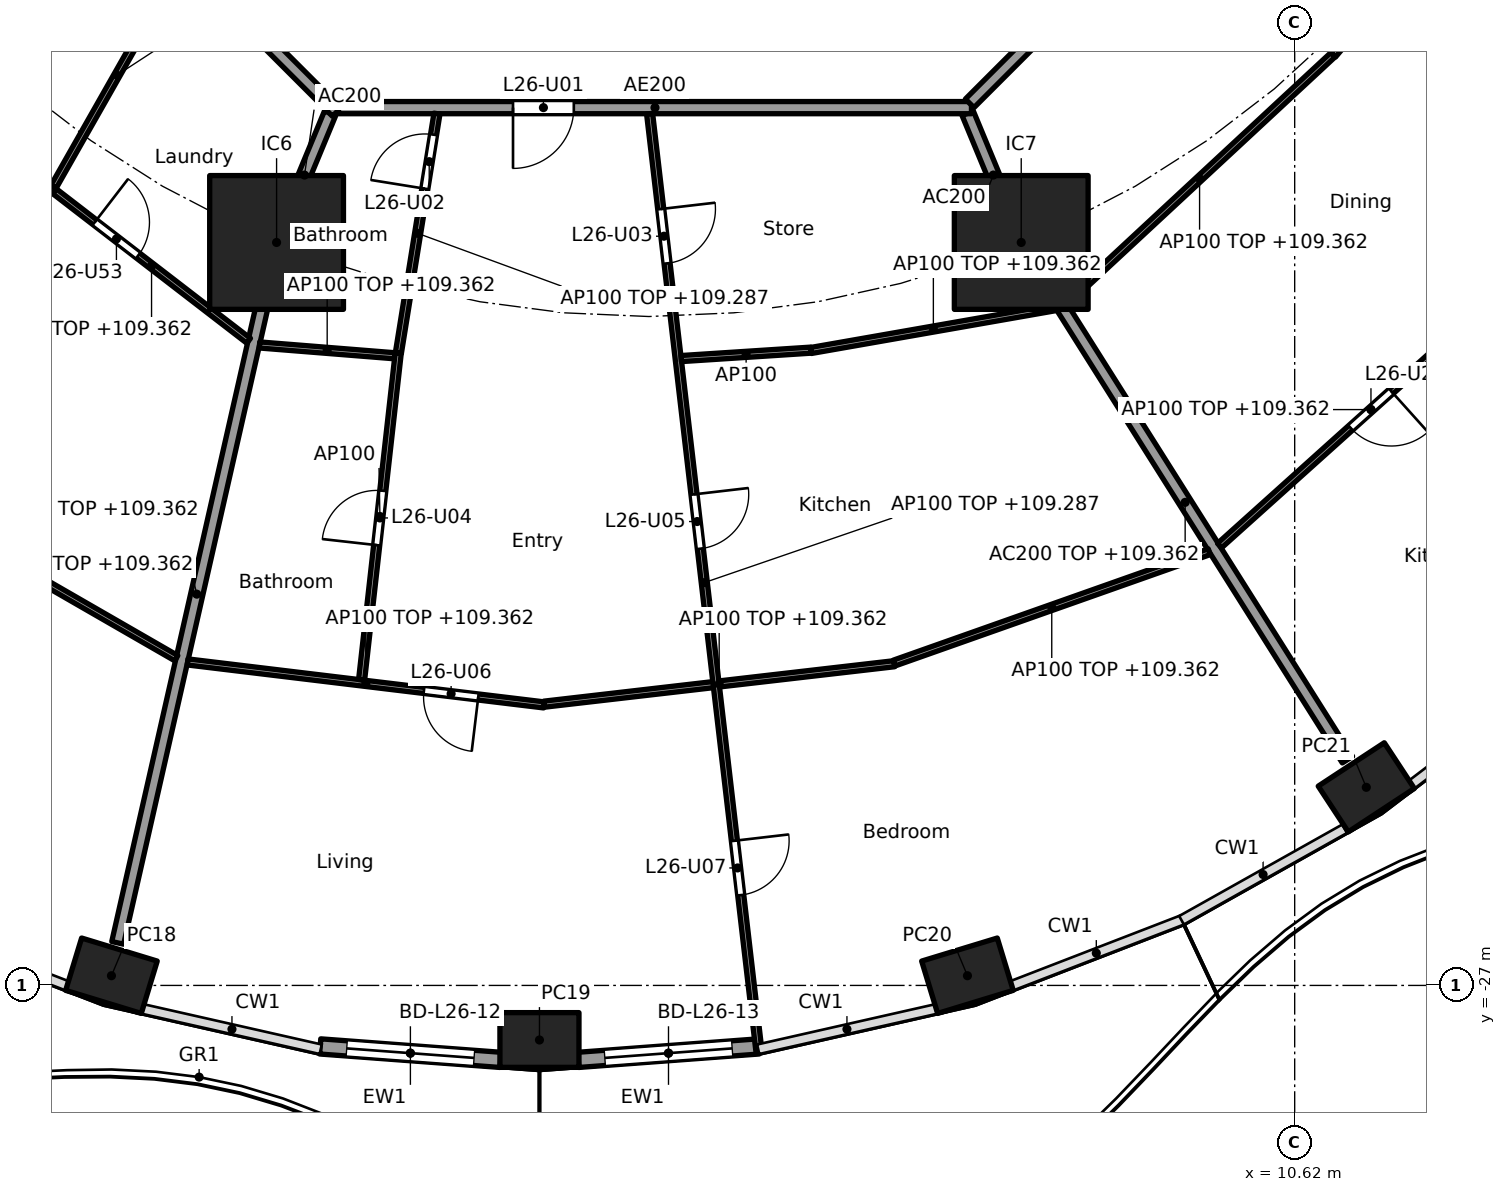
"""IFC4 building model, lengths in metres.
Left out: names, types, materials, properties, quantities, classifications, styles, units other than length and angle.
Written with IfcOpenShell. Run it as: python <this file> out.ifc"""

import sys

from ifc_helpers import new_model, si_unit, direction, frame, frame_2d, origin, origin_2d, place, context, subcontext, project, spatial, rectangle, hollow_rectangle, extrude, element, fill, save


model = new_model("IFC4")
c1 = context("Model", 3, precision=1e-05, world=origin(), true_north=direction((0.0, 1.0)))
c2 = subcontext(c1, "Body", "Model", "MODEL_VIEW")
j1 = project(units=[si_unit("LENGTHUNIT", "METRE"), si_unit("PLANEANGLEUNIT", "RADIAN")], contexts=[c1])
p1 = place(None, origin())
s1 = spatial("IfcSite", under=j1, at=p1, CompositionType="ELEMENT")
p2 = place(p1, origin())
s2 = spatial("IfcBuilding", under=s1, at=p2, CompositionType="ELEMENT")
p3 = place(p2, frame((0.0, 0.0, 106.6)))
s3 = spatial("IfcBuildingStorey", under=s2, at=p3, CompositionType="ELEMENT", Elevation=106.6)
for number, where, z_axis, x_axis in (
    (1, (-8.839, -26.841, 0.0), (0.0, 0.0, 1.0), (0.957, -0.292, 0.0)),
    (2, (-1.8, -27.897, 0.0), (0.0, 0.0, 1.0), (1.0, 0.0, 0.0)),
    (3, (5.239, -26.841, 0.0), (0.0, 0.0, 1.0), (0.957, 0.292, 0.0)),
    (4, (11.798, -23.742, 0.0), (0.0, 0.0, 1.0), (0.836, 0.549, 0.0)),
):
    element("IfcColumn", number, at=place(p3, frame(where, z_axis=z_axis, x_axis=x_axis)), inside=s3, PredefinedType="COLUMN", context=c2, shape_type="SweptSolid", body=[
        extrude(hollow_rectangle(XDim=1.3, YDim=0.9, WallThickness=0.045, at=origin_2d()), origin(), (0.0, 0.0, 1.0), 3.7),
    ])
for number, where, z_axis, x_axis in (
    (5, (-6.123, -14.782, 0.0), (0.0, 0.0, 1.0), (1.0, 0.0, 0.0)),
    (6, (6.123, -14.782, 0.0), (0.0, 0.0, 1.0), (1.0, 0.0, 0.0)),
):
    element("IfcColumn", number, at=place(p3, frame(where, z_axis=z_axis, x_axis=x_axis)), inside=s3, PredefinedType="COLUMN", context=c2, shape_type="SweptSolid", body=[
        extrude(rectangle(XDim=2.2, YDim=2.2, at=origin_2d()), origin(), (0.0, 0.0, 1.0), 3.7),
    ])
p4 = place(p3, frame((-2.439, -28.224, 0.0), z_axis=(0.0, 0.0, 1.0), x_axis=(-0.997225719788, 0.074436978672, 0.0)))
e7 = element("IfcWall", 7, at=p4, inside=s3, PredefinedType="SOLIDWALL", context=c2, shape_type="SweptSolid", body=[
    extrude(rectangle(XDim=2.975, YDim=0.25, at=frame_2d((1.487, 0.0))), origin(), (0.0, 0.0, 1.0), 3.44),
])
p5 = place(p4, frame((0.438, 0.0, 0.0)))
e8 = element("IfcOpeningElement", 8, at=p5, cuts=e7, PredefinedType="OPENING", context=c2, shape_type="SweptSolid", body=[
    extrude(rectangle(XDim=2.1, YDim=2.4, at=frame_2d((1.05, 1.2))), frame((0.0, 0.135, 0.0), z_axis=(0.0, -1.0, 0.0), x_axis=(1.0, 0.0, 0.0)), (0.0, 0.0, 1.0), 0.27),
])
p6 = place(p3, frame((1.806, -28.003, 0.0), z_axis=(0.0, 0.0, 1.0), x_axis=(-0.997226174467, -0.074430887117, 0.0)))
e9 = element("IfcWall", 9, at=p6, inside=s3, PredefinedType="SOLIDWALL", context=c2, shape_type="SweptSolid", body=[
    extrude(rectangle(XDim=2.975, YDim=0.25, at=frame_2d((1.488, 0.0))), origin(), (0.0, 0.0, 1.0), 3.44),
])
p7 = place(p6, frame((0.438, 0.0, 0.0)))
e10 = element("IfcOpeningElement", 10, at=p7, cuts=e9, PredefinedType="OPENING", context=c2, shape_type="SweptSolid", body=[
    extrude(rectangle(XDim=2.1, YDim=2.4, at=frame_2d((1.05, 1.2))), frame((0.0, 0.135, 0.0), z_axis=(0.0, -1.0, 0.0), x_axis=(1.0, 0.0, 0.0)), (0.0, 0.0, 1.0), 0.27),
])
p8 = place(p3, frame((-5.243, -12.657, 0.0), z_axis=(0.0, 0.0, 1.0), x_axis=(-0.382668627144, -0.923885664896, 0.0)))
e11 = element("IfcWall", 11, at=p8, inside=s3, PredefinedType="PARTITIONING", context=c2, shape_type="SweptSolid", body=[
    extrude(rectangle(XDim=2.2, YDim=0.2, at=frame_2d((1.1, 0.0))), origin(), (0.0, 0.0, 1.0), 3.44),
])
p9 = place(p3, frame((-6.134, -14.831, 0.0), z_axis=(0.0, 0.0, 1.0), x_axis=(-0.221225405869, -0.975222702667, 0.0)))
e12 = element("IfcWall", 12, at=p9, inside=s3, PredefinedType="PARTITIONING", context=c2, shape_type="SweptSolid", body=[
    extrude(rectangle(XDim=11.761, YDim=0.2, at=frame_2d((5.88, 0.0))), origin(), (0.0, 0.0, 1.0), 2.762),
])
p10 = place(p3, frame((5.243, -12.657, 0.0), z_axis=(0.0, 0.0, 1.0), x_axis=(0.382747093259, -0.923853160736, 0.0)))
e13 = element("IfcWall", 13, at=p10, inside=s3, PredefinedType="PARTITIONING", context=c2, shape_type="SweptSolid", body=[
    extrude(rectangle(XDim=2.2, YDim=0.2, at=frame_2d((1.1, 0.0))), origin(), (0.0, 0.0, 1.0), 3.44),
])
p11 = place(p3, frame((6.15, -14.824, 0.0), z_axis=(0.0, 0.0, 1.0), x_axis=(0.533492589682, -0.845804739142, 0.0)))
e14 = element("IfcWall", 14, at=p11, inside=s3, PredefinedType="PARTITIONING", context=c2, shape_type="SweptSolid", body=[
    extrude(rectangle(XDim=10.006, YDim=0.2, at=frame_2d((5.003, 0.0))), origin(), (0.0, 0.0, 1.0), 2.762),
])
p12 = place(p3, frame((-12.635, -5.134, 0.0), z_axis=(0.0, 0.0, 1.0), x_axis=(0.707106781187, -0.707106781187, 0.0)))
e15 = element("IfcWall", 15, at=p12, inside=s3, PredefinedType="PARTITIONING", context=c2, shape_type="SweptSolid", body=[
    extrude(rectangle(XDim=10.609, YDim=0.2, at=frame_2d((5.305, 0.0))), origin(), (0.0, 0.0, 1.0), 3.44),
])
p13 = place(p3, frame((-5.104, -12.565, 0.0), z_axis=(0.0, 0.0, 1.0), x_axis=(1.0, 0.0, 0.0)))
e16 = element("IfcWall", 16, at=p13, inside=s3, PredefinedType="PARTITIONING", context=c2, shape_type="SweptSolid", body=[
    extrude(rectangle(XDim=10.409, YDim=0.2, at=frame_2d((5.205, 0.0))), origin(), (0.0, 0.0, 1.0), 3.44),
])
p14 = place(p13, frame((2.87, 0.0, 0.0)))
e17 = element("IfcOpeningElement", 17, at=p14, cuts=e16, PredefinedType="OPENING", context=c2, shape_type="SweptSolid", body=[
    extrude(rectangle(XDim=1.0, YDim=2.1, at=frame_2d((0.5, 1.05))), frame((0.0, 0.11, 0.0), z_axis=(0.0, -1.0, 0.0), x_axis=(1.0, 0.0, 0.0)), (0.0, 0.0, 1.0), 0.22),
])
p15 = place(p3, frame((5.275, -12.494, 0.0), z_axis=(0.0, 0.0, 1.0), x_axis=(0.707106781187, 0.707106781187, 0.0)))
e18 = element("IfcWall", 18, at=p15, inside=s3, PredefinedType="PARTITIONING", context=c2, shape_type="SweptSolid", body=[
    extrude(rectangle(XDim=10.409, YDim=0.2, at=frame_2d((5.205, 0.0))), origin(), (0.0, 0.0, 1.0), 3.44),
])
p16 = place(p3, frame((-13.118, -10.8, 0.0), z_axis=(0.0, 0.0, 1.0), x_axis=(0.72818280142, -0.685382964273, 0.0)))
e19 = element("IfcWall", 19, at=p16, inside=s3, PredefinedType="PARTITIONING", context=c2, shape_type="SweptSolid", body=[
    extrude(rectangle(XDim=4.586, YDim=0.1, at=frame_2d((2.293, 0.0))), origin(), (0.0, 0.0, 1.0), 2.762),
])
p17 = place(p3, frame((-7.707, -10.198, 0.0), z_axis=(0.0, 0.0, 1.0), x_axis=(-0.493986531217, -0.869469554945, 0.0)))
e20 = element("IfcWall", 20, at=p17, inside=s3, PredefinedType="PARTITIONING", context=c2, shape_type="SweptSolid", body=[
    extrude(rectangle(XDim=4.217, YDim=0.1, at=frame_2d((2.109, 0.0))), origin(), (0.0, 0.0, 1.0), 2.687),
])
p18 = place(p3, frame((-9.775, -13.939, 0.0), z_axis=(0.0, 0.0, 1.0), x_axis=(0.792162117554, -0.610310723741, 0.0)))
e21 = element("IfcWall", 21, at=p18, inside=s3, PredefinedType="PARTITIONING", context=c2, shape_type="SweptSolid", body=[
    extrude(rectangle(XDim=4.03, YDim=0.1, at=frame_2d((2.015, 0.0))), origin(), (0.0, 0.0, 1.0), 2.762),
])
p19 = place(p18, frame((0.836, 0.0, 0.0)))
e22 = element("IfcOpeningElement", 22, at=p19, cuts=e21, PredefinedType="OPENING", context=c2, shape_type="SweptSolid", body=[
    extrude(rectangle(XDim=0.9, YDim=2.1, at=frame_2d((0.45, 1.05))), frame((0.0, 0.06, 0.0), z_axis=(0.0, -1.0, 0.0), x_axis=(1.0, 0.0, 0.0)), (0.0, 0.0, 1.0), 0.12),
])
p20 = place(p3, frame((-12.568, -18.856, 0.0), z_axis=(0.0, 0.0, 1.0), x_axis=(0.866533437451, -0.499119025664, 0.0)))
e23 = element("IfcWall", 23, at=p20, inside=s3, PredefinedType="PARTITIONING", context=c2, shape_type="SweptSolid", body=[
    extrude(rectangle(XDim=5.535, YDim=0.1, at=frame_2d((2.768, 0.0))), origin(), (0.0, 0.0, 1.0), 2.762),
])
p21 = place(p3, frame((-6.404, -16.468, 0.0), z_axis=(0.0, 0.0, 1.0), x_axis=(0.996819101134, -0.079697425392, 0.0)))
e24 = element("IfcWall", 24, at=p21, inside=s3, PredefinedType="PARTITIONING", context=c2, shape_type="SweptSolid", body=[
    extrude(rectangle(XDim=2.233, YDim=0.1, at=frame_2d((1.117, 0.0))), origin(), (0.0, 0.0, 1.0), 2.762),
])
p22 = place(p3, frame((-7.586, -21.68, 0.0), z_axis=(0.0, 0.0, 1.0), x_axis=(0.992810535213, -0.119696454295, 0.0)))
e25 = element("IfcWall", 25, at=p22, inside=s3, PredefinedType="PARTITIONING", context=c2, shape_type="SweptSolid", body=[
    extrude(rectangle(XDim=5.903, YDim=0.1, at=frame_2d((2.951, 0.0))), origin(), (0.0, 0.0, 1.0), 2.762),
])
p23 = place(p22, frame((3.915, 0.0, 0.0)))
e26 = element("IfcOpeningElement", 26, at=p23, cuts=e25, PredefinedType="OPENING", context=c2, shape_type="SweptSolid", body=[
    extrude(rectangle(XDim=0.9, YDim=2.1, at=frame_2d((0.45, 1.05))), frame((0.0, 0.06, 0.0), z_axis=(0.0, -1.0, 0.0), x_axis=(1.0, 0.0, 0.0)), (0.0, 0.0, 1.0), 0.12),
])
p24 = place(p3, frame((-3.486, -12.664, 0.0), z_axis=(0.0, 0.0, 1.0), x_axis=(-0.159124641548, -0.987258501332, 0.0)))
e27 = element("IfcWall", 27, at=p24, inside=s3, PredefinedType="PARTITIONING", context=c2, shape_type="SweptSolid", body=[
    extrude(rectangle(XDim=3.988, YDim=0.1, at=frame_2d((1.994, 0.0))), origin(), (0.0, 0.0, 1.0), 2.687),
])
p25 = place(p24, frame((0.35, 0.0, 0.0)))
e28 = element("IfcOpeningElement", 28, at=p25, cuts=e27, PredefinedType="OPENING", context=c2, shape_type="SweptSolid", body=[
    extrude(rectangle(XDim=0.9, YDim=2.1, at=frame_2d((0.45, 1.05))), frame((0.0, 0.06, 0.0), z_axis=(0.0, -1.0, 0.0), x_axis=(1.0, 0.0, 0.0)), (0.0, 0.0, 1.0), 0.12),
])
p26 = place(p3, frame((-4.122, -16.6, 0.0), z_axis=(0.0, 0.0, 1.0), x_axis=(-0.111357928679, -0.993780363924, 0.0)))
e29 = element("IfcWall", 29, at=p26, inside=s3, PredefinedType="PARTITIONING", context=c2, shape_type="SweptSolid", body=[
    extrude(rectangle(XDim=5.409, YDim=0.1, at=frame_2d((2.704, 0.0))), origin(), (0.0, 0.0, 1.0), 3.44),
])
p27 = place(p26, frame((2.279, 0.0, 0.0)))
e30 = element("IfcOpeningElement", 30, at=p27, cuts=e29, PredefinedType="OPENING", context=c2, shape_type="SweptSolid", body=[
    extrude(rectangle(XDim=0.9, YDim=2.1, at=frame_2d((0.45, 1.05))), frame((0.0, 0.06, 0.0), z_axis=(0.0, -1.0, 0.0), x_axis=(1.0, 0.0, 0.0)), (0.0, 0.0, 1.0), 0.12),
])
p28 = place(p3, frame((-1.726, -22.375, 0.0), z_axis=(0.0, 0.0, 1.0), x_axis=(0.993392336919, 0.114767874207, 0.0)))
e31 = element("IfcWall", 31, at=p28, inside=s3, PredefinedType="PARTITIONING", context=c2, shape_type="SweptSolid", body=[
    extrude(rectangle(XDim=5.801, YDim=0.1, at=frame_2d((2.9, 0.0))), origin(), (0.0, 0.0, 1.0), 2.762),
])
p29 = place(p3, frame((0.011, -12.664, 0.0), z_axis=(0.0, 0.0, 1.0), x_axis=(0.115841404661, -0.993267722704, 0.0)))
e32 = element("IfcWall", 32, at=p29, inside=s3, PredefinedType="PARTITIONING", context=c2, shape_type="SweptSolid", body=[
    extrude(rectangle(XDim=15.528, YDim=0.1, at=frame_2d((7.764, 0.0))), origin(), (0.0, 0.0, 1.0), 2.687),
])
p30 = place(p29, frame((1.579, 0.0, 0.0)))
e33 = element("IfcOpeningElement", 33, at=p30, cuts=e32, PredefinedType="OPENING", context=c2, shape_type="SweptSolid", body=[
    extrude(rectangle(XDim=0.9, YDim=2.1, at=frame_2d((0.45, 1.05))), frame((0.0, 0.06, 0.0), z_axis=(0.0, -1.0, 0.0), x_axis=(1.0, 0.0, 0.0)), (0.0, 0.0, 1.0), 0.12),
])
p31 = place(p29, frame((6.303, 0.0, 0.0)))
e34 = element("IfcOpeningElement", 34, at=p31, cuts=e32, PredefinedType="OPENING", context=c2, shape_type="SweptSolid", body=[
    extrude(rectangle(XDim=0.9, YDim=2.1, at=frame_2d((0.45, 1.05))), frame((0.0, 0.06, 0.0), z_axis=(0.0, -1.0, 0.0), x_axis=(1.0, 0.0, 0.0)), (0.0, 0.0, 1.0), 0.12),
])
p32 = place(p29, frame((12.038, 0.0, 0.0)))
e35 = element("IfcOpeningElement", 35, at=p32, cuts=e32, PredefinedType="OPENING", context=c2, shape_type="SweptSolid", body=[
    extrude(rectangle(XDim=0.9, YDim=2.1, at=frame_2d((0.45, 1.05))), frame((0.0, 0.06, 0.0), z_axis=(0.0, -1.0, 0.0), x_axis=(1.0, 0.0, 0.0)), (0.0, 0.0, 1.0), 0.12),
])
p33 = place(p3, frame((0.531, -16.691, 0.0), z_axis=(0.0, 0.0, 1.0), x_axis=(0.997895869517, 0.064836977109, 0.0)))
e36 = element("IfcWall", 36, at=p33, inside=s3, PredefinedType="PARTITIONING", context=c2, shape_type="SweptSolid", body=[
    extrude(rectangle(XDim=2.139, YDim=0.1, at=frame_2d((1.069, 0.0))), origin(), (0.0, 0.0, 1.0), 3.44),
])
p34 = place(p3, frame((2.667, -16.558, 0.0), z_axis=(0.0, 0.0, 1.0), x_axis=(0.984996445375, 0.172574629069, 0.0)))
e37 = element("IfcWall", 37, at=p34, inside=s3, PredefinedType="PARTITIONING", context=c2, shape_type="SweptSolid", body=[
    extrude(rectangle(XDim=4.084, YDim=0.1, at=frame_2d((2.042, 0.0))), origin(), (0.0, 0.0, 1.0), 2.762),
])
p35 = place(p3, frame((4.034, -21.698, 0.0), z_axis=(0.0, 0.0, 1.0), x_axis=(0.942861482644, 0.33318497047, 0.0)))
e38 = element("IfcWall", 38, at=p35, inside=s3, PredefinedType="PARTITIONING", context=c2, shape_type="SweptSolid", body=[
    extrude(rectangle(XDim=5.495, YDim=0.1, at=frame_2d((2.748, 0.0))), origin(), (0.0, 0.0, 1.0), 2.762),
])
p36 = place(p3, frame((6.861, -15.768, 0.0), z_axis=(0.0, 0.0, 1.0), x_axis=(0.733011256509, 0.680216508056, 0.0)))
e39 = element("IfcWall", 39, at=p36, inside=s3, PredefinedType="PARTITIONING", context=c2, shape_type="SweptSolid", body=[
    extrude(rectangle(XDim=5.989, YDim=0.1, at=frame_2d((2.994, 0.0))), origin(), (0.0, 0.0, 1.0), 2.762),
])
p37 = place(p3, frame((9.384, -19.768, 0.0), z_axis=(0.0, 0.0, 1.0), x_axis=(0.74387407395, 0.668319805262, 0.0)))
e40 = element("IfcWall", 40, at=p37, inside=s3, PredefinedType="PARTITIONING", context=c2, shape_type="SweptSolid", body=[
    extrude(rectangle(XDim=6.695, YDim=0.1, at=frame_2d((3.348, 0.0))), origin(), (0.0, 0.0, 1.0), 2.762),
])
p38 = place(p37, frame((2.898, 0.0, 0.0)))
e41 = element("IfcOpeningElement", 41, at=p38, cuts=e40, PredefinedType="OPENING", context=c2, shape_type="SweptSolid", body=[
    extrude(rectangle(XDim=0.9, YDim=2.1, at=frame_2d((0.45, 1.05))), frame((0.0, 0.06, 0.0), z_axis=(0.0, -1.0, 0.0), x_axis=(1.0, 0.0, 0.0)), (0.0, 0.0, 1.0), 0.12),
])
p39 = place(p3, frame((11.255, -11.699, 0.0), z_axis=(0.0, 0.0, 1.0), x_axis=(0.64610637779, 0.763247370503, 0.0)))
e42 = element("IfcWall", 42, at=p39, inside=s3, PredefinedType="PARTITIONING", context=c2, shape_type="SweptSolid", body=[
    extrude(rectangle(XDim=6.467, YDim=0.1, at=frame_2d((3.233, 0.0))), origin(), (0.0, 0.0, 1.0), 2.762),
])
p40 = place(p39, frame((2.809, 0.0, 0.0)))
e43 = element("IfcOpeningElement", 43, at=p40, cuts=e42, PredefinedType="OPENING", context=c2, shape_type="SweptSolid", body=[
    extrude(rectangle(XDim=0.9, YDim=2.1, at=frame_2d((0.45, 1.05))), frame((0.0, 0.06, 0.0), z_axis=(0.0, -1.0, 0.0), x_axis=(1.0, 0.0, 0.0)), (0.0, 0.0, 1.0), 0.12),
])
p41 = place(p5, origin())
e44 = element("IfcDoor", 44, at=p41, inside=s3, OperationType="SLIDING_TO_LEFT", PredefinedType="DOOR", context=c2, shape_type="SweptSolid", body=[
    extrude(rectangle(XDim=2.1, YDim=2.4, at=frame_2d((1.05, 1.2))), frame((0.0, 0.025, 0.0), z_axis=(0.0, -1.0, 0.0), x_axis=(1.0, 0.0, 0.0)), (0.0, 0.0, 1.0), 0.05),
])
fill(e8, e44)
p42 = place(p7, origin())
e45 = element("IfcDoor", 45, at=p42, inside=s3, OperationType="SLIDING_TO_LEFT", PredefinedType="DOOR", context=c2, shape_type="SweptSolid", body=[
    extrude(rectangle(XDim=2.1, YDim=2.4, at=frame_2d((1.05, 1.2))), frame((0.0, 0.025, 0.0), z_axis=(0.0, -1.0, 0.0), x_axis=(1.0, 0.0, 0.0)), (0.0, 0.0, 1.0), 0.05),
])
fill(e10, e45)
p43 = place(p14, frame((1.0, 0.0, 0.0), x_axis=(-1.0, 0.0, 0.0)))
e46 = element("IfcDoor", 46, at=p43, inside=s3, OperationType="SINGLE_SWING_RIGHT", PredefinedType="DOOR", context=c2, shape_type="SweptSolid", body=[
    extrude(rectangle(XDim=1.0, YDim=2.1, at=frame_2d((0.5, 1.05))), frame((0.0, 0.025, 0.0), z_axis=(0.0, -1.0, 0.0), x_axis=(1.0, 0.0, 0.0)), (0.0, 0.0, 1.0), 0.05),
])
fill(e17, e46)
p44 = place(p25, frame((0.9, 0.0, 0.0), x_axis=(-1.0, 0.0, 0.0)))
e47 = element("IfcDoor", 47, at=p44, inside=s3, OperationType="SINGLE_SWING_LEFT", PredefinedType="DOOR", context=c2, shape_type="SweptSolid", body=[
    extrude(rectangle(XDim=0.9, YDim=2.1, at=frame_2d((0.45, 1.05))), frame((0.0, 0.025, 0.0), z_axis=(0.0, -1.0, 0.0), x_axis=(1.0, 0.0, 0.0)), (0.0, 0.0, 1.0), 0.05),
])
fill(e28, e47)
p45 = place(p30, origin())
e48 = element("IfcDoor", 48, at=p45, inside=s3, OperationType="SINGLE_SWING_LEFT", PredefinedType="DOOR", context=c2, shape_type="SweptSolid", body=[
    extrude(rectangle(XDim=0.9, YDim=2.1, at=frame_2d((0.45, 1.05))), frame((0.0, 0.025, 0.0), z_axis=(0.0, -1.0, 0.0), x_axis=(1.0, 0.0, 0.0)), (0.0, 0.0, 1.0), 0.05),
])
fill(e33, e48)
p46 = place(p27, frame((0.9, 0.0, 0.0), x_axis=(-1.0, 0.0, 0.0)))
e49 = element("IfcDoor", 49, at=p46, inside=s3, OperationType="SINGLE_SWING_LEFT", PredefinedType="DOOR", context=c2, shape_type="SweptSolid", body=[
    extrude(rectangle(XDim=0.9, YDim=2.1, at=frame_2d((0.45, 1.05))), frame((0.0, 0.025, 0.0), z_axis=(0.0, -1.0, 0.0), x_axis=(1.0, 0.0, 0.0)), (0.0, 0.0, 1.0), 0.05),
])
fill(e30, e49)
p47 = place(p31, origin())
e50 = element("IfcDoor", 50, at=p47, inside=s3, OperationType="SINGLE_SWING_LEFT", PredefinedType="DOOR", context=c2, shape_type="SweptSolid", body=[
    extrude(rectangle(XDim=0.9, YDim=2.1, at=frame_2d((0.45, 1.05))), frame((0.0, 0.025, 0.0), z_axis=(0.0, -1.0, 0.0), x_axis=(1.0, 0.0, 0.0)), (0.0, 0.0, 1.0), 0.05),
])
fill(e34, e50)
p48 = place(p23, frame((0.9, 0.0, 0.0), x_axis=(-1.0, 0.0, 0.0)))
e51 = element("IfcDoor", 51, at=p48, inside=s3, OperationType="SINGLE_SWING_LEFT", PredefinedType="DOOR", context=c2, shape_type="SweptSolid", body=[
    extrude(rectangle(XDim=0.9, YDim=2.1, at=frame_2d((0.45, 1.05))), frame((0.0, 0.025, 0.0), z_axis=(0.0, -1.0, 0.0), x_axis=(1.0, 0.0, 0.0)), (0.0, 0.0, 1.0), 0.05),
])
fill(e26, e51)
p49 = place(p32, origin())
e52 = element("IfcDoor", 52, at=p49, inside=s3, OperationType="SINGLE_SWING_LEFT", PredefinedType="DOOR", context=c2, shape_type="SweptSolid", body=[
    extrude(rectangle(XDim=0.9, YDim=2.1, at=frame_2d((0.45, 1.05))), frame((0.0, 0.025, 0.0), z_axis=(0.0, -1.0, 0.0), x_axis=(1.0, 0.0, 0.0)), (0.0, 0.0, 1.0), 0.05),
])
fill(e35, e52)
p50 = place(p38, frame((0.9, 0.0, 0.0), x_axis=(-1.0, 0.0, 0.0)))
e53 = element("IfcDoor", 53, at=p50, inside=s3, OperationType="SINGLE_SWING_LEFT", PredefinedType="DOOR", context=c2, shape_type="SweptSolid", body=[
    extrude(rectangle(XDim=0.9, YDim=2.1, at=frame_2d((0.45, 1.05))), frame((0.0, 0.025, 0.0), z_axis=(0.0, -1.0, 0.0), x_axis=(1.0, 0.0, 0.0)), (0.0, 0.0, 1.0), 0.05),
])
fill(e41, e53)
p51 = place(p19, origin())
e54 = element("IfcDoor", 54, at=p51, inside=s3, OperationType="SINGLE_SWING_LEFT", PredefinedType="DOOR", context=c2, shape_type="SweptSolid", body=[
    extrude(rectangle(XDim=0.9, YDim=2.1, at=frame_2d((0.45, 1.05))), frame((0.0, 0.025, 0.0), z_axis=(0.0, -1.0, 0.0), x_axis=(1.0, 0.0, 0.0)), (0.0, 0.0, 1.0), 0.05),
])
fill(e22, e54)
save(model, sys.argv[1])
